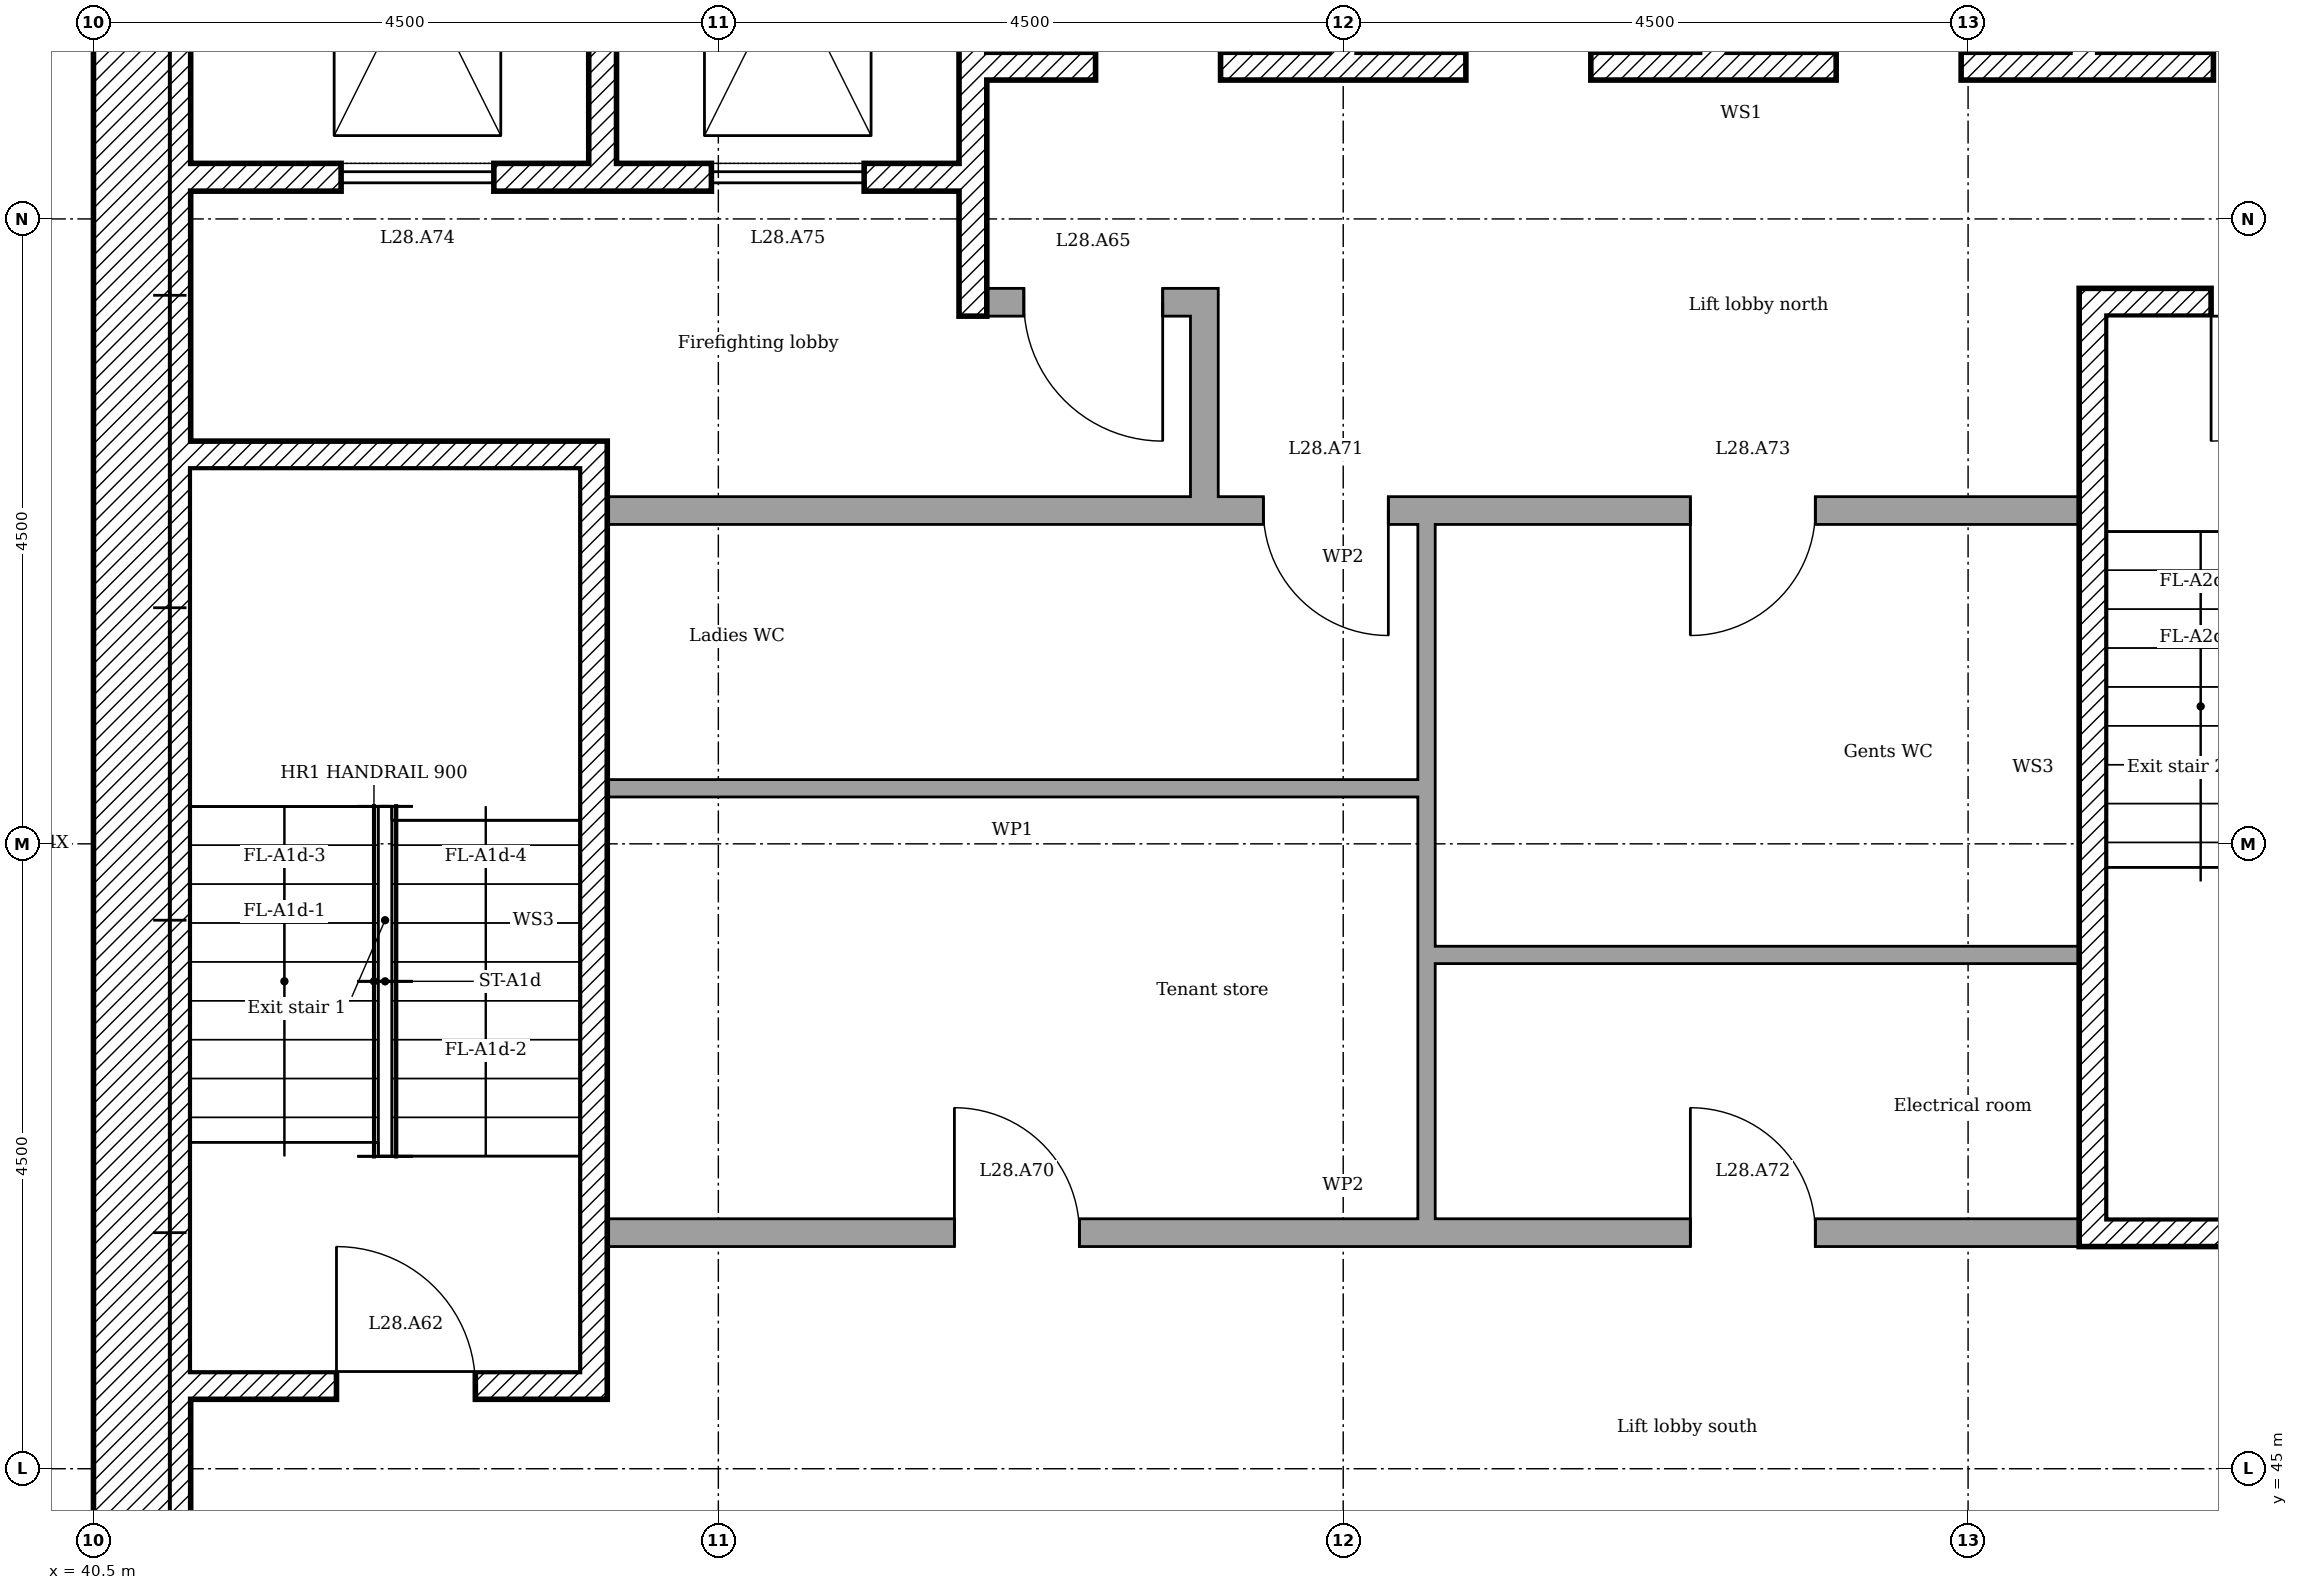
"""IFC4 building model, lengths in metres.
Left out: names, types, materials, properties, quantities, classifications, styles, units other than length and angle.
Written with IfcOpenShell. Run it as: python <this file> out.ifc"""

import sys

from ifc_helpers import new_model, si_unit, direction, frame, frame_2d, origin, place, context, subcontext, project, spatial, rectangle, extrude, element, fill, save


model = new_model("IFC4")
c1 = context("Model", 3, precision=1e-05, world=origin(), true_north=direction((0.0, 1.0)))
c2 = subcontext(c1, "Body", "Model", "MODEL_VIEW")
j1 = project(units=[si_unit("LENGTHUNIT", "METRE"), si_unit("PLANEANGLEUNIT", "RADIAN")], contexts=[c1])
p1 = place(None, origin())
s1 = spatial("IfcSite", under=j1, at=p1, CompositionType="ELEMENT")
p2 = place(p1, origin())
s2 = spatial("IfcBuilding", under=s1, at=p2, CompositionType="ELEMENT")
p3 = place(p2, frame((0.0, 0.0, 113.6)))
s3 = spatial("IfcBuildingStorey", under=s2, at=p3, CompositionType="ELEMENT", Elevation=113.6)
p4 = place(p3, frame((40.85, 40.5, 0.0), z_axis=(0.0, 0.0, 1.0), x_axis=(0.0, 1.0, 0.0)))
e1 = element("IfcWall", 1, at=p4, inside=s3, PredefinedType="SHEAR", context=c2, shape_type="SweptSolid", body=[
    extrude(rectangle(XDim=18.0, YDim=0.7, at=frame_2d((9.0, 0.0))), origin(), (0.0, 0.0, 1.0), 6.95),
])
p5 = place(p3, frame((44.167, 57.8, 0.0), z_axis=(0.0, 0.0, 1.0), x_axis=(0.0, -1.0, 0.0)))
e2 = element("IfcWall", 2, at=p5, inside=s3, PredefinedType="SHEAR", context=c2, shape_type="SweptSolid", body=[
    extrude(rectangle(XDim=3.4, YDim=0.2, at=frame_2d((1.7, 0.0))), origin(), (0.0, 0.0, 1.0), 6.95),
])
p6 = place(p3, frame((46.833, 57.8, 0.0), z_axis=(0.0, 0.0, 1.0), x_axis=(0.0, -1.0, 0.0)))
e3 = element("IfcWall", 3, at=p6, inside=s3, PredefinedType="SHEAR", context=c2, shape_type="SweptSolid", body=[
    extrude(rectangle(XDim=4.5, YDim=0.2, at=frame_2d((2.25, 0.0))), origin(), (0.0, 0.0, 1.0), 6.95),
])
p7 = place(p3, frame((48.5, 51.9, 0.0), z_axis=(0.0, 0.0, 1.0), x_axis=(0.0, 1.0, 0.0)))
e4 = element("IfcWall", 4, at=p7, inside=s3, PredefinedType="PARTITIONING", context=c2, shape_type="SweptSolid", body=[
    extrude(rectangle(XDim=1.6, YDim=0.2, at=frame_2d((0.8, 0.0))), origin(), (0.0, 0.0, 1.0), 6.95),
])
p8 = place(p3, frame((46.933, 53.4, 0.0)))
e5 = element("IfcWall", 5, at=p8, inside=s3, PredefinedType="PARTITIONING", context=c2, shape_type="SweptSolid", body=[
    extrude(rectangle(XDim=1.467, YDim=0.2, at=frame_2d((0.733, 0.0))), origin(), (0.0, 0.0, 1.0), 6.95),
])
p9 = place(p8, frame((0.267, 0.0, 0.0)))
e6 = element("IfcOpeningElement", 6, at=p9, cuts=e5, PredefinedType="OPENING", context=c2, shape_type="SweptSolid", body=[
    extrude(rectangle(XDim=1.0, YDim=2.1, at=frame_2d((0.5, 1.05))), frame((0.0, 0.11, 0.0), z_axis=(0.0, -1.0, 0.0), x_axis=(1.0, 0.0, 0.0)), (0.0, 0.0, 1.0), 0.22),
])
p10 = place(p3, frame((46.933, 55.1, 0.0)))
e7 = element("IfcWall", 7, at=p10, inside=s3, PredefinedType="SHEAR", context=c2, shape_type="SweptSolid", body=[
    extrude(rectangle(XDim=10.867, YDim=0.2, at=frame_2d((5.433, 0.0))), origin(), (0.0, 0.0, 1.0), 6.95),
])
p11 = place(p10, frame((8.833, 0.0, 0.0)))
e8 = element("IfcOpeningElement", 8, at=p11, cuts=e7, PredefinedType="OPENING", context=c2, shape_type="SweptSolid", body=[
    extrude(rectangle(XDim=0.9, YDim=2.1, at=frame_2d((0.45, 1.05))), frame((0.0, 0.11, 0.0), z_axis=(0.0, -1.0, 0.0), x_axis=(1.0, 0.0, 0.0)), (0.0, 0.0, 1.0), 0.22),
])
p12 = place(p10, frame((0.783, 0.0, 0.0)))
e9 = element("IfcOpeningElement", 9, at=p12, cuts=e7, PredefinedType="OPENING", context=c2, shape_type="SweptSolid", body=[
    extrude(rectangle(XDim=0.9, YDim=2.1, at=frame_2d((0.45, 1.05))), frame((0.0, 0.11, 0.0), z_axis=(0.0, -1.0, 0.0), x_axis=(1.0, 0.0, 0.0)), (0.0, 0.0, 1.0), 0.22),
])
p13 = place(p10, frame((3.45, 0.0, 0.0)))
e10 = element("IfcOpeningElement", 10, at=p13, cuts=e7, PredefinedType="OPENING", context=c2, shape_type="SweptSolid", body=[
    extrude(rectangle(XDim=0.9, YDim=2.1, at=frame_2d((0.45, 1.05))), frame((0.0, 0.11, 0.0), z_axis=(0.0, -1.0, 0.0), x_axis=(1.0, 0.0, 0.0)), (0.0, 0.0, 1.0), 0.22),
])
p14 = place(p10, frame((6.117, 0.0, 0.0)))
e11 = element("IfcOpeningElement", 11, at=p14, cuts=e7, PredefinedType="OPENING", context=c2, shape_type="SweptSolid", body=[
    extrude(rectangle(XDim=0.9, YDim=2.1, at=frame_2d((0.45, 1.05))), frame((0.0, 0.11, 0.0), z_axis=(0.0, -1.0, 0.0), x_axis=(1.0, 0.0, 0.0)), (0.0, 0.0, 1.0), 0.22),
])
p15 = place(p3, frame((41.2, 54.3, 0.0)))
e12 = element("IfcWall", 12, at=p15, inside=s3, PredefinedType="SHEAR", context=c2, shape_type="SweptSolid", body=[
    extrude(rectangle(XDim=5.533, YDim=0.2, at=frame_2d((2.767, 0.0))), origin(), (0.0, 0.0, 1.0), 6.95),
])
p16 = place(p15, frame((1.083, 0.0, 0.0)))
e13 = element("IfcOpeningElement", 13, at=p16, cuts=e12, PredefinedType="OPENING", context=c2, shape_type="SweptSolid", body=[
    extrude(rectangle(XDim=1.1, YDim=2.1, at=frame_2d((0.55, 1.05))), frame((0.0, 0.11, 0.0), z_axis=(0.0, -1.0, 0.0), x_axis=(1.0, 0.0, 0.0)), (0.0, 0.0, 1.0), 0.22),
])
p17 = place(p15, frame((3.75, 0.0, 0.0)))
e14 = element("IfcOpeningElement", 14, at=p17, cuts=e12, PredefinedType="OPENING", context=c2, shape_type="SweptSolid", body=[
    extrude(rectangle(XDim=1.1, YDim=2.1, at=frame_2d((0.55, 1.05))), frame((0.0, 0.11, 0.0), z_axis=(0.0, -1.0, 0.0), x_axis=(1.0, 0.0, 0.0)), (0.0, 0.0, 1.0), 0.22),
])
p18 = place(p3, frame((44.1, 45.5, 0.0), z_axis=(0.0, 0.0, 1.0), x_axis=(0.0, 1.0, 0.0)))
e15 = element("IfcWall", 15, at=p18, inside=s3, PredefinedType="SHEAR", context=c2, shape_type="SweptSolid", body=[
    extrude(rectangle(XDim=6.9, YDim=0.2, at=frame_2d((3.45, 0.0))), origin(), (0.0, 0.0, 1.0), 6.95),
])
p19 = place(p3, frame((41.2, 52.3, 0.0)))
e16 = element("IfcWall", 16, at=p19, inside=s3, PredefinedType="SHEAR", context=c2, shape_type="SweptSolid", body=[
    extrude(rectangle(XDim=2.8, YDim=0.2, at=frame_2d((1.4, 0.0))), origin(), (0.0, 0.0, 1.0), 6.95),
])
p20 = place(p3, frame((41.2, 45.6, 0.0)))
e17 = element("IfcWall", 17, at=p20, inside=s3, PredefinedType="SHEAR", context=c2, shape_type="SweptSolid", body=[
    extrude(rectangle(XDim=2.8, YDim=0.2, at=frame_2d((1.4, 0.0))), origin(), (0.0, 0.0, 1.0), 6.95),
])
p21 = place(p20, frame((1.05, 0.0, 0.0)))
e18 = element("IfcOpeningElement", 18, at=p21, cuts=e17, PredefinedType="OPENING", context=c2, shape_type="SweptSolid", body=[
    extrude(rectangle(XDim=1.0, YDim=2.1, at=frame_2d((0.5, 1.05))), frame((0.0, 0.11, 0.0), z_axis=(0.0, -1.0, 0.0), x_axis=(1.0, 0.0, 0.0)), (0.0, 0.0, 1.0), 0.22),
])
p22 = place(p3, frame((54.8, 53.4, 0.0)))
e19 = element("IfcWall", 19, at=p22, inside=s3, PredefinedType="SHEAR", context=c2, shape_type="SweptSolid", body=[
    extrude(rectangle(XDim=3.0, YDim=0.2, at=frame_2d((1.5, 0.0))), origin(), (0.0, 0.0, 1.0), 6.95),
])
p23 = place(p22, frame((0.95, 0.0, 0.0)))
e20 = element("IfcOpeningElement", 20, at=p23, cuts=e19, PredefinedType="OPENING", context=c2, shape_type="SweptSolid", body=[
    extrude(rectangle(XDim=1.0, YDim=2.1, at=frame_2d((0.5, 1.05))), frame((0.0, 0.11, 0.0), z_axis=(0.0, -1.0, 0.0), x_axis=(1.0, 0.0, 0.0)), (0.0, 0.0, 1.0), 0.22),
])
p24 = place(p3, frame((54.8, 46.7, 0.0)))
e21 = element("IfcWall", 21, at=p24, inside=s3, PredefinedType="SHEAR", context=c2, shape_type="SweptSolid", body=[
    extrude(rectangle(XDim=3.0, YDim=0.2, at=frame_2d((1.5, 0.0))), origin(), (0.0, 0.0, 1.0), 6.95),
])
p25 = place(p3, frame((54.9, 46.8, 0.0), z_axis=(0.0, 0.0, 1.0), x_axis=(0.0, 1.0, 0.0)))
e22 = element("IfcWall", 22, at=p25, inside=s3, PredefinedType="SHEAR", context=c2, shape_type="SweptSolid", body=[
    extrude(rectangle(XDim=6.5, YDim=0.2, at=frame_2d((3.25, 0.0))), origin(), (0.0, 0.0, 1.0), 6.95),
])
p26 = place(p3, frame((44.2, 51.9, 0.0)))
e23 = element("IfcWall", 23, at=p26, inside=s3, PredefinedType="PARTITIONING", context=c2, shape_type="SweptSolid", body=[
    extrude(rectangle(XDim=10.6, YDim=0.2, at=frame_2d((5.3, 0.0))), origin(), (0.0, 0.0, 1.0), 6.95),
])
p27 = place(p26, frame((4.725, 0.0, 0.0)))
e24 = element("IfcOpeningElement", 24, at=p27, cuts=e23, PredefinedType="OPENING", context=c2, shape_type="SweptSolid", body=[
    extrude(rectangle(XDim=0.9, YDim=2.1, at=frame_2d((0.45, 1.05))), frame((0.0, 0.11, 0.0), z_axis=(0.0, -1.0, 0.0), x_axis=(1.0, 0.0, 0.0)), (0.0, 0.0, 1.0), 0.22),
])
p28 = place(p26, frame((7.8, 0.0, 0.0)))
e25 = element("IfcOpeningElement", 25, at=p28, cuts=e23, PredefinedType="OPENING", context=c2, shape_type="SweptSolid", body=[
    extrude(rectangle(XDim=0.9, YDim=2.1, at=frame_2d((0.45, 1.05))), frame((0.0, 0.11, 0.0), z_axis=(0.0, -1.0, 0.0), x_axis=(1.0, 0.0, 0.0)), (0.0, 0.0, 1.0), 0.22),
])
p29 = place(p3, frame((44.2, 46.7, 0.0)))
e26 = element("IfcWall", 26, at=p29, inside=s3, PredefinedType="PARTITIONING", context=c2, shape_type="SweptSolid", body=[
    extrude(rectangle(XDim=10.6, YDim=0.2, at=frame_2d((5.3, 0.0))), origin(), (0.0, 0.0, 1.0), 6.95),
])
p30 = place(p29, frame((2.5, 0.0, 0.0)))
e27 = element("IfcOpeningElement", 27, at=p30, cuts=e26, PredefinedType="OPENING", context=c2, shape_type="SweptSolid", body=[
    extrude(rectangle(XDim=0.9, YDim=2.1, at=frame_2d((0.45, 1.05))), frame((0.0, 0.11, 0.0), z_axis=(0.0, -1.0, 0.0), x_axis=(1.0, 0.0, 0.0)), (0.0, 0.0, 1.0), 0.22),
])
p31 = place(p29, frame((7.8, 0.0, 0.0)))
e28 = element("IfcOpeningElement", 28, at=p31, cuts=e26, PredefinedType="OPENING", context=c2, shape_type="SweptSolid", body=[
    extrude(rectangle(XDim=0.9, YDim=2.1, at=frame_2d((0.45, 1.05))), frame((0.0, 0.11, 0.0), z_axis=(0.0, -1.0, 0.0), x_axis=(1.0, 0.0, 0.0)), (0.0, 0.0, 1.0), 0.22),
])
p32 = place(p3, frame((50.1, 46.8, 0.0), z_axis=(0.0, 0.0, 1.0), x_axis=(0.0, 1.0, 0.0)))
e29 = element("IfcWall", 29, at=p32, inside=s3, PredefinedType="PARTITIONING", context=c2, shape_type="SweptSolid", body=[
    extrude(rectangle(XDim=1.962, YDim=0.125, at=frame_2d((0.981, 0.0))), origin(), (0.0, 0.0, 1.0), 6.95),
])
p33 = place(p3, frame((54.8, 48.7, 0.0), z_axis=(0.0, 0.0, 1.0), x_axis=(-1.0, 0.0, 0.0)))
e30 = element("IfcWall", 30, at=p33, inside=s3, PredefinedType="PARTITIONING", context=c2, shape_type="SweptSolid", body=[
    extrude(rectangle(XDim=4.637, YDim=0.125, at=frame_2d((2.319, 0.0))), origin(), (0.0, 0.0, 1.0), 6.95),
])
p34 = place(p3, frame((50.1, 48.7, 0.0), z_axis=(0.0, 0.0, 1.0), x_axis=(0.0, 1.0, 0.0)))
e31 = element("IfcWall", 31, at=p34, inside=s3, PredefinedType="PARTITIONING", context=c2, shape_type="SweptSolid", body=[
    extrude(rectangle(XDim=1.262, YDim=0.125, at=frame_2d((0.631, 0.0))), origin(), (0.0, 0.0, 1.0), 6.95),
])
p35 = place(p3, frame((50.038, 49.9, 0.0), z_axis=(0.0, 0.0, 1.0), x_axis=(-1.0, 0.0, 0.0)))
e32 = element("IfcWall", 32, at=p35, inside=s3, PredefinedType="PARTITIONING", context=c2, shape_type="SweptSolid", body=[
    extrude(rectangle(XDim=5.838, YDim=0.125, at=frame_2d((2.919, 0.0))), origin(), (0.0, 0.0, 1.0), 6.95),
])
p36 = place(p3, frame((50.1, 49.9, 0.0), z_axis=(0.0, 0.0, 1.0), x_axis=(0.0, 1.0, 0.0)))
e33 = element("IfcWall", 33, at=p36, inside=s3, PredefinedType="PARTITIONING", context=c2, shape_type="SweptSolid", body=[
    extrude(rectangle(XDim=1.9, YDim=0.125, at=frame_2d((0.95, 0.0))), origin(), (0.0, 0.0, 1.0), 6.95),
])
p37 = place(p21, origin())
e34 = element("IfcDoor", 34, at=p37, inside=s3, OperationType="SINGLE_SWING_RIGHT", PredefinedType="DOOR", context=c2, shape_type="SweptSolid", body=[
    extrude(rectangle(XDim=1.0, YDim=2.1, at=frame_2d((0.5, 1.05))), frame((0.0, 0.025, 0.0), z_axis=(0.0, -1.0, 0.0), x_axis=(1.0, 0.0, 0.0)), (0.0, 0.0, 1.0), 0.05),
])
fill(e18, e34)
p38 = place(p23, frame((1.0, 0.0, 0.0), x_axis=(-1.0, 0.0, 0.0)))
e35 = element("IfcDoor", 35, at=p38, inside=s3, OperationType="SINGLE_SWING_LEFT", PredefinedType="DOOR", context=c2, shape_type="SweptSolid", body=[
    extrude(rectangle(XDim=1.0, YDim=2.1, at=frame_2d((0.5, 1.05))), frame((0.0, 0.025, 0.0), z_axis=(0.0, -1.0, 0.0), x_axis=(1.0, 0.0, 0.0)), (0.0, 0.0, 1.0), 0.05),
])
fill(e20, e35)
p39 = place(p9, frame((1.0, 0.0, 0.0), x_axis=(-1.0, 0.0, 0.0)))
e36 = element("IfcDoor", 36, at=p39, inside=s3, OperationType="SINGLE_SWING_RIGHT", PredefinedType="DOOR", context=c2, shape_type="SweptSolid", body=[
    extrude(rectangle(XDim=1.0, YDim=2.1, at=frame_2d((0.5, 1.05))), frame((0.0, 0.025, 0.0), z_axis=(0.0, -1.0, 0.0), x_axis=(1.0, 0.0, 0.0)), (0.0, 0.0, 1.0), 0.05),
])
fill(e6, e36)
p40 = place(p11, origin())
e37 = element("IfcDoor", 37, at=p40, inside=s3, OperationType="SINGLE_SWING_RIGHT", PredefinedType="DOOR", context=c2, shape_type="SweptSolid", body=[
    extrude(rectangle(XDim=0.9, YDim=2.1, at=frame_2d((0.45, 1.05))), frame((0.0, 0.025, 0.0), z_axis=(0.0, -1.0, 0.0), x_axis=(1.0, 0.0, 0.0)), (0.0, 0.0, 1.0), 0.05),
])
fill(e8, e37)
p41 = place(p12, origin())
e38 = element("IfcDoor", 38, at=p41, inside=s3, OperationType="SINGLE_SWING_RIGHT", PredefinedType="DOOR", context=c2, shape_type="SweptSolid", body=[
    extrude(rectangle(XDim=0.9, YDim=2.1, at=frame_2d((0.45, 1.05))), frame((0.0, 0.025, 0.0), z_axis=(0.0, -1.0, 0.0), x_axis=(1.0, 0.0, 0.0)), (0.0, 0.0, 1.0), 0.05),
])
fill(e9, e38)
p42 = place(p13, origin())
e39 = element("IfcDoor", 39, at=p42, inside=s3, OperationType="SINGLE_SWING_RIGHT", PredefinedType="DOOR", context=c2, shape_type="SweptSolid", body=[
    extrude(rectangle(XDim=0.9, YDim=2.1, at=frame_2d((0.45, 1.05))), frame((0.0, 0.025, 0.0), z_axis=(0.0, -1.0, 0.0), x_axis=(1.0, 0.0, 0.0)), (0.0, 0.0, 1.0), 0.05),
])
fill(e10, e39)
p43 = place(p14, origin())
e40 = element("IfcDoor", 40, at=p43, inside=s3, OperationType="SINGLE_SWING_RIGHT", PredefinedType="DOOR", context=c2, shape_type="SweptSolid", body=[
    extrude(rectangle(XDim=0.9, YDim=2.1, at=frame_2d((0.45, 1.05))), frame((0.0, 0.025, 0.0), z_axis=(0.0, -1.0, 0.0), x_axis=(1.0, 0.0, 0.0)), (0.0, 0.0, 1.0), 0.05),
])
fill(e11, e40)
p44 = place(p30, origin())
e41 = element("IfcDoor", 41, at=p44, inside=s3, OperationType="SINGLE_SWING_RIGHT", PredefinedType="DOOR", context=c2, shape_type="SweptSolid", body=[
    extrude(rectangle(XDim=0.9, YDim=2.1, at=frame_2d((0.45, 1.05))), frame((0.0, 0.025, 0.0), z_axis=(0.0, -1.0, 0.0), x_axis=(1.0, 0.0, 0.0)), (0.0, 0.0, 1.0), 0.05),
])
fill(e27, e41)
p45 = place(p27, frame((0.9, 0.0, 0.0), x_axis=(-1.0, 0.0, 0.0)))
e42 = element("IfcDoor", 42, at=p45, inside=s3, OperationType="SINGLE_SWING_RIGHT", PredefinedType="DOOR", context=c2, shape_type="SweptSolid", body=[
    extrude(rectangle(XDim=0.9, YDim=2.1, at=frame_2d((0.45, 1.05))), frame((0.0, 0.025, 0.0), z_axis=(0.0, -1.0, 0.0), x_axis=(1.0, 0.0, 0.0)), (0.0, 0.0, 1.0), 0.05),
])
fill(e24, e42)
p46 = place(p31, origin())
e43 = element("IfcDoor", 43, at=p46, inside=s3, OperationType="SINGLE_SWING_RIGHT", PredefinedType="DOOR", context=c2, shape_type="SweptSolid", body=[
    extrude(rectangle(XDim=0.9, YDim=2.1, at=frame_2d((0.45, 1.05))), frame((0.0, 0.025, 0.0), z_axis=(0.0, -1.0, 0.0), x_axis=(1.0, 0.0, 0.0)), (0.0, 0.0, 1.0), 0.05),
])
fill(e28, e43)
p47 = place(p28, frame((0.9, 0.0, 0.0), x_axis=(-1.0, 0.0, 0.0)))
e44 = element("IfcDoor", 44, at=p47, inside=s3, OperationType="SINGLE_SWING_LEFT", PredefinedType="DOOR", context=c2, shape_type="SweptSolid", body=[
    extrude(rectangle(XDim=0.9, YDim=2.1, at=frame_2d((0.45, 1.05))), frame((0.0, 0.025, 0.0), z_axis=(0.0, -1.0, 0.0), x_axis=(1.0, 0.0, 0.0)), (0.0, 0.0, 1.0), 0.05),
])
fill(e25, e44)
p48 = place(p16, origin())
e45 = element("IfcDoor", 45, at=p48, inside=s3, OperationType="SLIDING_TO_LEFT", PredefinedType="DOOR", context=c2, shape_type="SweptSolid", body=[
    extrude(rectangle(XDim=1.1, YDim=2.1, at=frame_2d((0.55, 1.05))), frame((0.0, 0.025, 0.0), z_axis=(0.0, -1.0, 0.0), x_axis=(1.0, 0.0, 0.0)), (0.0, 0.0, 1.0), 0.05),
])
fill(e13, e45)
p49 = place(p17, origin())
e46 = element("IfcDoor", 46, at=p49, inside=s3, OperationType="SLIDING_TO_LEFT", PredefinedType="DOOR", context=c2, shape_type="SweptSolid", body=[
    extrude(rectangle(XDim=1.1, YDim=2.1, at=frame_2d((0.55, 1.05))), frame((0.0, 0.025, 0.0), z_axis=(0.0, -1.0, 0.0), x_axis=(1.0, 0.0, 0.0)), (0.0, 0.0, 1.0), 0.05),
])
fill(e14, e46)
save(model, sys.argv[1])
